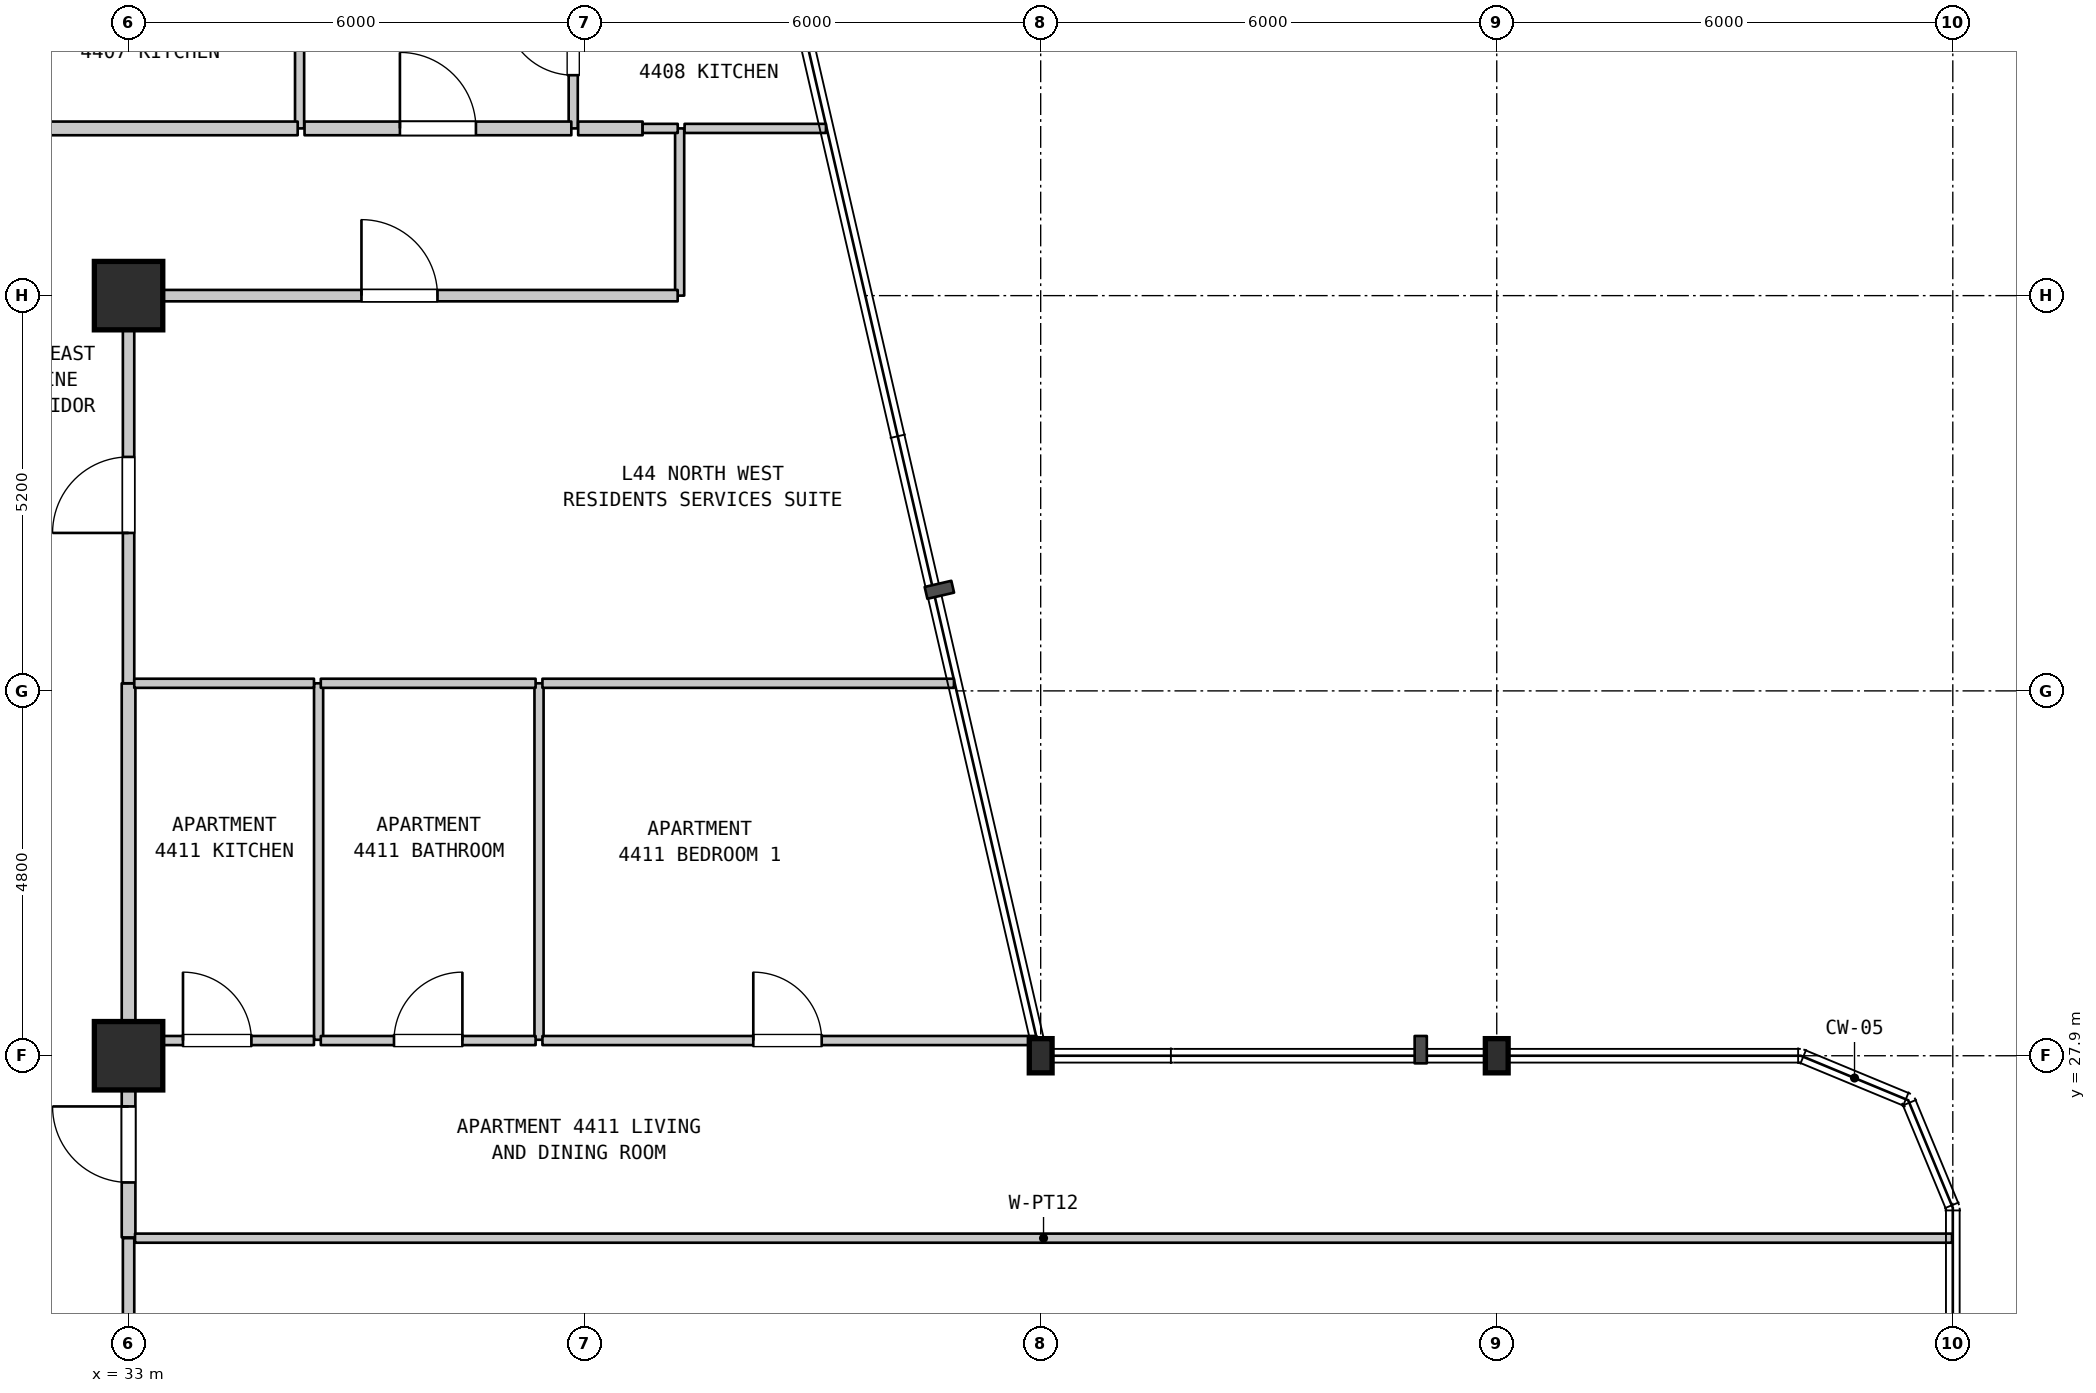
"""IFC4 building model, lengths in metres.
Left out: names, types, materials, properties, quantities, classifications, styles, units other than length and angle.
Written with IfcOpenShell. Run it as: python <this file> out.ifc"""

import sys

from ifc_helpers import new_model, si_unit, direction, frame, frame_2d, origin, origin_2d, place, context, subcontext, project, spatial, rectangle, i_section, extrude, element, fill, save


model = new_model("IFC4")
c1 = context("Model", 3, precision=1e-05, world=origin(), true_north=direction((0.0, 1.0)))
c2 = subcontext(c1, "Body", "Model", "MODEL_VIEW")
j1 = project(units=[si_unit("LENGTHUNIT", "METRE"), si_unit("PLANEANGLEUNIT", "RADIAN")], contexts=[c1])
p1 = place(None, origin())
s1 = spatial("IfcSite", under=j1, at=p1, CompositionType="ELEMENT")
p2 = place(p1, origin())
s2 = spatial("IfcBuilding", under=s1, at=p2, CompositionType="ELEMENT")
p3 = place(p2, frame((0.0, 0.0, 180.2)))
s3 = spatial("IfcBuildingStorey", under=s2, at=p3, CompositionType="ELEMENT", Elevation=180.2)
for number, where, z_axis, x_axis in (
    (1, (33.0, 27.9, 0.0), (0.0, 0.0, 1.0), (1.0, 0.0, 0.0)),
    (2, (33.0, 37.9, 0.0), (0.0, 0.0, 1.0), (1.0, 0.0, 0.0)),
):
    element("IfcColumn", number, at=place(p3, frame(where, z_axis=z_axis, x_axis=x_axis)), inside=s3, PredefinedType="COLUMN", context=c2, shape_type="SweptSolid", body=[
        extrude(rectangle(XDim=0.9, YDim=0.9, at=origin_2d()), origin(), (0.0, 0.0, 1.0), 3.7),
    ])
for number, where, z_axis, x_axis in (
    (3, (45.0, 27.9, 0.0), (0.0, 0.0, 1.0), (1.0, 0.0, 0.0)),
    (4, (51.0, 27.9, 0.0), (0.0, 0.0, 1.0), (1.0, 0.0, 0.0)),
):
    element("IfcColumn", number, at=place(p3, frame(where, z_axis=z_axis, x_axis=x_axis)), inside=s3, PredefinedType="COLUMN", context=c2, shape_type="SweptSolid", body=[
        extrude(i_section(OverallWidth=0.3, OverallDepth=0.45, WebThickness=0.014, FlangeThickness=0.026, FilletRadius=0.027, at=origin_2d()), origin(), (0.0, 0.0, 1.0), 3.7),
    ])
p4 = place(p3, frame((33.0, 19.51, 0.0), z_axis=(0.0, 0.0, 1.0), x_axis=(0.0, 1.0, 0.0)))
e5 = element("IfcWall", 5, at=p4, inside=s3, PredefinedType="STANDARD", context=c2, shape_type="SweptSolid", body=[
    extrude(rectangle(XDim=5.99, YDim=0.15, at=frame_2d((2.995, 0.0))), origin(), (0.0, 0.0, 1.0), 2.98),
])
p5 = place(p4, frame((1.513, 0.0, 0.0)))
e6 = element("IfcOpeningElement", 6, at=p5, cuts=e5, PredefinedType="OPENING", context=c2, shape_type="SweptSolid", body=[
    extrude(rectangle(XDim=1.0, YDim=2.15, at=frame_2d((0.5, 1.075))), frame((0.0, 0.085, 0.0), z_axis=(0.0, -1.0, 0.0), x_axis=(1.0, 0.0, 0.0)), (0.0, 0.0, 1.0), 0.17),
])
p6 = place(p3, frame((33.0, 25.51, 0.0), z_axis=(0.0, 0.0, 1.0), x_axis=(0.0, 1.0, 0.0)))
e7 = element("IfcWall", 7, at=p6, inside=s3, PredefinedType="STANDARD", context=c2, shape_type="SweptSolid", body=[
    extrude(rectangle(XDim=2.6, YDim=0.18, at=frame_2d((1.3, 0.0))), origin(), (0.0, 0.0, 1.0), 2.98),
])
p7 = place(p6, frame((0.723, 0.0, 0.0)))
e8 = element("IfcOpeningElement", 8, at=p7, cuts=e7, PredefinedType="OPENING", context=c2, shape_type="SweptSolid", body=[
    extrude(rectangle(XDim=1.0, YDim=2.15, at=frame_2d((0.5, 1.075))), frame((0.0, 0.1, 0.0), z_axis=(0.0, -1.0, 0.0), x_axis=(1.0, 0.0, 0.0)), (0.0, 0.0, 1.0), 0.2),
])
p8 = place(p3, frame((33.0, 28.11, 0.0), z_axis=(0.0, 0.0, 1.0), x_axis=(0.0, 1.0, 0.0)))
e9 = element("IfcWall", 9, at=p8, inside=s3, PredefinedType="STANDARD", context=c2, shape_type="SweptSolid", body=[
    extrude(rectangle(XDim=4.69, YDim=0.18, at=frame_2d((2.345, 0.0))), origin(), (0.0, 0.0, 1.0), 2.88),
])
p9 = place(p3, frame((33.0, 32.8, 0.0), z_axis=(0.0, 0.0, 1.0), x_axis=(0.0, 1.0, 0.0)))
e10 = element("IfcWall", 10, at=p9, inside=s3, PredefinedType="STANDARD", context=c2, shape_type="SweptSolid", body=[
    extrude(rectangle(XDim=5.1, YDim=0.15, at=frame_2d((2.55, 0.0))), origin(), (0.0, 0.0, 1.0), 2.88),
])
p10 = place(p9, frame((1.978, 0.0, 0.0)))
e11 = element("IfcOpeningElement", 11, at=p10, cuts=e10, PredefinedType="OPENING", context=c2, shape_type="SweptSolid", body=[
    extrude(rectangle(XDim=1.0, YDim=2.15, at=frame_2d((0.5, 1.075))), frame((0.0, 0.085, 0.0), z_axis=(0.0, -1.0, 0.0), x_axis=(1.0, 0.0, 0.0)), (0.0, 0.0, 1.0), 0.17),
])
p11 = place(p3, frame((35.25, 40.1, 0.0), z_axis=(0.0, 0.0, 1.0), x_axis=(0.0, 1.0, 0.0)))
e12 = element("IfcWall", 12, at=p11, inside=s3, PredefinedType="PARTITIONING", context=c2, shape_type="SweptSolid", body=[
    extrude(rectangle(XDim=2.3, YDim=0.12, at=frame_2d((1.15, 0.0))), origin(), (0.0, 0.0, 1.0), 3.38),
])
for number, where, z_axis, x_axis in (
    (13, (35.5, 28.11, 0.0), (0.0, 0.0, 1.0), (0.0, 1.0, 0.0)),
    (14, (38.4, 28.11, 0.0), (0.0, 0.0, 1.0), (0.0, 1.0, 0.0)),
):
    element("IfcWall", number, at=place(p3, frame(where, z_axis=z_axis, x_axis=x_axis)), inside=s3, PredefinedType="PARTITIONING", context=c2, shape_type="SweptSolid", body=[
        extrude(rectangle(XDim=4.69, YDim=0.12, at=frame_2d((2.345, 0.0))), origin(), (0.0, 0.0, 1.0), 3.38),
    ])
p12 = place(p3, frame((38.85, 40.1, 0.0), z_axis=(0.0, 0.0, 1.0), x_axis=(0.0, 1.0, 0.0)))
e15 = element("IfcWall", 15, at=p12, inside=s3, PredefinedType="PARTITIONING", context=c2, shape_type="SweptSolid", body=[
    extrude(rectangle(XDim=2.3, YDim=0.12, at=frame_2d((1.15, 0.0))), origin(), (0.0, 0.0, 1.0), 3.38),
])
p13 = place(p12, frame((0.7, 0.0, 0.0)))
e16 = element("IfcOpeningElement", 16, at=p13, cuts=e15, PredefinedType="OPENING", context=c2, shape_type="SweptSolid", body=[
    extrude(rectangle(XDim=0.9, YDim=2.15, at=frame_2d((0.45, 1.075))), frame((0.0, 0.07, 0.0), z_axis=(0.0, -1.0, 0.0), x_axis=(1.0, 0.0, 0.0)), (0.0, 0.0, 1.0), 0.14),
])
p14 = place(p3, frame((40.25, 37.9, 0.0), z_axis=(0.0, 0.0, 1.0), x_axis=(0.0, 1.0, 0.0)))
e17 = element("IfcWall", 17, at=p14, inside=s3, PredefinedType="PARTITIONING", context=c2, shape_type="SweptSolid", body=[
    extrude(rectangle(XDim=2.2, YDim=0.12, at=frame_2d((1.1, 0.0))), origin(), (0.0, 0.0, 1.0), 3.38),
])
p15 = place(p3, frame((33.085, 25.5, 0.0), z_axis=(0.0, 0.0, 1.0), x_axis=(1.0, 0.0, 0.0)))
e18 = element("IfcWall", 18, at=p15, inside=s3, PredefinedType="PARTITIONING", context=c2, shape_type="SweptSolid", body=[
    extrude(rectangle(XDim=23.905, YDim=0.12, at=frame_2d((11.953, 0.0))), origin(), (0.0, 0.0, 1.0), 3.38),
])
p16 = place(p3, frame((33.075, 28.1, 0.0), z_axis=(0.0, 0.0, 1.0), x_axis=(1.0, 0.0, 0.0)))
e19 = element("IfcWall", 19, at=p16, inside=s3, PredefinedType="PARTITIONING", context=c2, shape_type="SweptSolid", body=[
    extrude(rectangle(XDim=2.364, YDim=0.12, at=frame_2d((1.182, 0.0))), origin(), (0.0, 0.0, 1.0), 3.38),
])
p17 = place(p16, frame((0.641, 0.0, 0.0)))
e20 = element("IfcOpeningElement", 20, at=p17, cuts=e19, PredefinedType="OPENING", context=c2, shape_type="SweptSolid", body=[
    extrude(rectangle(XDim=0.9, YDim=2.15, at=frame_2d((0.45, 1.075))), frame((0.0, 0.07, 0.0), z_axis=(0.0, -1.0, 0.0), x_axis=(1.0, 0.0, 0.0)), (0.0, 0.0, 1.0), 0.14),
])
p18 = place(p3, frame((35.529, 28.1, 0.0), z_axis=(0.0, 0.0, 1.0), x_axis=(1.0, 0.0, 0.0)))
e21 = element("IfcWall", 21, at=p18, inside=s3, PredefinedType="PARTITIONING", context=c2, shape_type="SweptSolid", body=[
    extrude(rectangle(XDim=2.826, YDim=0.12, at=frame_2d((1.413, 0.0))), origin(), (0.0, 0.0, 1.0), 3.38),
])
p19 = place(p18, frame((0.963, 0.0, 0.0)))
e22 = element("IfcOpeningElement", 22, at=p19, cuts=e21, PredefinedType="OPENING", context=c2, shape_type="SweptSolid", body=[
    extrude(rectangle(XDim=0.9, YDim=2.1, at=frame_2d((0.45, 1.05))), frame((0.0, 0.07, 0.0), z_axis=(0.0, -1.0, 0.0), x_axis=(1.0, 0.0, 0.0)), (0.0, 0.0, 1.0), 0.14),
])
p20 = place(p3, frame((38.445, 28.1, 0.0), z_axis=(0.0, 0.0, 1.0), x_axis=(1.0, 0.0, 0.0)))
e23 = element("IfcWall", 23, at=p20, inside=s3, PredefinedType="PARTITIONING", context=c2, shape_type="SweptSolid", body=[
    extrude(rectangle(XDim=6.499, YDim=0.12, at=frame_2d((3.25, 0.0))), origin(), (0.0, 0.0, 1.0), 3.38),
])
p21 = place(p20, frame((2.774, 0.0, 0.0)))
e24 = element("IfcOpeningElement", 24, at=p21, cuts=e23, PredefinedType="OPENING", context=c2, shape_type="SweptSolid", body=[
    extrude(rectangle(XDim=0.9, YDim=2.15, at=frame_2d((0.45, 1.075))), frame((0.0, 0.07, 0.0), z_axis=(0.0, -1.0, 0.0), x_axis=(1.0, 0.0, 0.0)), (0.0, 0.0, 1.0), 0.14),
])
p22 = place(p3, frame((33.075, 32.8, 0.0), z_axis=(0.0, 0.0, 1.0), x_axis=(1.0, 0.0, 0.0)))
e25 = element("IfcWall", 25, at=p22, inside=s3, PredefinedType="PARTITIONING", context=c2, shape_type="SweptSolid", body=[
    extrude(rectangle(XDim=2.364, YDim=0.12, at=frame_2d((1.182, 0.0))), origin(), (0.0, 0.0, 1.0), 3.38),
])
p23 = place(p3, frame((35.529, 32.8, 0.0), z_axis=(0.0, 0.0, 1.0), x_axis=(1.0, 0.0, 0.0)))
e26 = element("IfcWall", 26, at=p23, inside=s3, PredefinedType="PARTITIONING", context=c2, shape_type="SweptSolid", body=[
    extrude(rectangle(XDim=2.826, YDim=0.12, at=frame_2d((1.413, 0.0))), origin(), (0.0, 0.0, 1.0), 3.38),
])
p24 = place(p3, frame((38.445, 32.8, 0.0), z_axis=(0.0, 0.0, 1.0), x_axis=(1.0, 0.0, 0.0)))
e27 = element("IfcWall", 27, at=p24, inside=s3, PredefinedType="PARTITIONING", context=c2, shape_type="SweptSolid", body=[
    extrude(rectangle(XDim=5.414, YDim=0.12, at=frame_2d((2.707, 0.0))), origin(), (0.0, 0.0, 1.0), 3.38),
])
p25 = place(p3, frame((33.06, 37.9, 0.0), z_axis=(0.0, 0.0, 1.0), x_axis=(1.0, 0.0, 0.0)))
e28 = element("IfcWall", 28, at=p25, inside=s3, PredefinedType="STANDARD", context=c2, shape_type="SweptSolid", body=[
    extrude(rectangle(XDim=7.164, YDim=0.15, at=frame_2d((3.582, 0.0))), origin(), (0.0, 0.0, 1.0), 3.38),
])
p26 = place(p25, frame((3.004, 0.0, 0.0)))
e29 = element("IfcOpeningElement", 29, at=p26, cuts=e28, PredefinedType="OPENING", context=c2, shape_type="SweptSolid", body=[
    extrude(rectangle(XDim=1.0, YDim=2.15, at=frame_2d((0.5, 1.075))), frame((0.0, 0.085, 0.0), z_axis=(0.0, -1.0, 0.0), x_axis=(1.0, 0.0, 0.0)), (0.0, 0.0, 1.0), 0.17),
])
p27 = place(p3, frame((30.875, 40.1, 0.0), z_axis=(0.0, 0.0, 1.0), x_axis=(1.0, 0.0, 0.0)))
e30 = element("IfcWall", 30, at=p27, inside=s3, PredefinedType="STANDARD", context=c2, shape_type="SweptSolid", body=[
    extrude(rectangle(XDim=4.35, YDim=0.18, at=frame_2d((2.175, 0.0))), origin(), (0.0, 0.0, 1.0), 3.38),
])
p28 = place(p3, frame((35.315, 40.1, 0.0), z_axis=(0.0, 0.0, 1.0), x_axis=(1.0, 0.0, 0.0)))
e31 = element("IfcWall", 31, at=p28, inside=s3, PredefinedType="STANDARD", context=c2, shape_type="SweptSolid", body=[
    extrude(rectangle(XDim=3.51, YDim=0.18, at=frame_2d((1.755, 0.0))), origin(), (0.0, 0.0, 1.0), 3.38),
])
p29 = place(p28, frame((1.255, 0.0, 0.0)))
e32 = element("IfcOpeningElement", 32, at=p29, cuts=e31, PredefinedType="OPENING", context=c2, shape_type="SweptSolid", body=[
    extrude(rectangle(XDim=1.0, YDim=2.15, at=frame_2d((0.5, 1.075))), frame((0.0, 0.1, 0.0), z_axis=(0.0, -1.0, 0.0), x_axis=(1.0, 0.0, 0.0)), (0.0, 0.0, 1.0), 0.2),
])
p30 = place(p3, frame((38.915, 40.1, 0.0), z_axis=(0.0, 0.0, 1.0), x_axis=(1.0, 0.0, 0.0)))
e33 = element("IfcWall", 33, at=p30, inside=s3, PredefinedType="STANDARD", context=c2, shape_type="SweptSolid", body=[
    extrude(rectangle(XDim=0.848, YDim=0.18, at=frame_2d((0.424, 0.0))), origin(), (0.0, 0.0, 1.0), 3.38),
])
p31 = place(p3, frame((39.763, 40.1, 0.0), z_axis=(0.0, 0.0, 1.0), x_axis=(1.0, 0.0, 0.0)))
e34 = element("IfcWall", 34, at=p31, inside=s3, PredefinedType="PARTITIONING", context=c2, shape_type="SweptSolid", body=[
    extrude(rectangle(XDim=0.462, YDim=0.12, at=frame_2d((0.231, 0.0))), origin(), (0.0, 0.0, 1.0), 3.38),
])
p32 = place(p3, frame((40.315, 40.1, 0.0), z_axis=(0.0, 0.0, 1.0), x_axis=(1.0, 0.0, 0.0)))
e35 = element("IfcWall", 35, at=p32, inside=s3, PredefinedType="PARTITIONING", context=c2, shape_type="SweptSolid", body=[
    extrude(rectangle(XDim=1.86, YDim=0.12, at=frame_2d((0.93, 0.0))), origin(), (0.0, 0.0, 1.0), 3.38),
])
p33 = place(p7, origin())
e36 = element("IfcDoor", 36, at=p33, inside=s3, OperationType="SINGLE_SWING_RIGHT", PredefinedType="DOOR", context=c2, shape_type="SweptSolid", body=[
    extrude(rectangle(XDim=1.0, YDim=2.15, at=frame_2d((0.5, 1.075))), frame((0.0, 0.025, 0.0), z_axis=(0.0, -1.0, 0.0), x_axis=(1.0, 0.0, 0.0)), (0.0, 0.0, 1.0), 0.05),
])
fill(e8, e36)
p34 = place(p10, origin())
e37 = element("IfcDoor", 37, at=p34, inside=s3, OperationType="SINGLE_SWING_LEFT", PredefinedType="DOOR", context=c2, shape_type="SweptSolid", body=[
    extrude(rectangle(XDim=1.0, YDim=2.15, at=frame_2d((0.5, 1.075))), frame((0.0, 0.025, 0.0), z_axis=(0.0, -1.0, 0.0), x_axis=(1.0, 0.0, 0.0)), (0.0, 0.0, 1.0), 0.05),
])
fill(e11, e37)
p35 = place(p13, origin())
e38 = element("IfcDoor", 38, at=p35, inside=s3, OperationType="SINGLE_SWING_RIGHT", PredefinedType="DOOR", context=c2, shape_type="SweptSolid", body=[
    extrude(rectangle(XDim=0.9, YDim=2.15, at=frame_2d((0.45, 1.075))), frame((0.0, 0.025, 0.0), z_axis=(0.0, -1.0, 0.0), x_axis=(1.0, 0.0, 0.0)), (0.0, 0.0, 1.0), 0.05),
])
fill(e16, e38)
p36 = place(p17, origin())
e39 = element("IfcDoor", 39, at=p36, inside=s3, OperationType="SINGLE_SWING_LEFT", PredefinedType="DOOR", context=c2, shape_type="SweptSolid", body=[
    extrude(rectangle(XDim=0.9, YDim=2.15, at=frame_2d((0.45, 1.075))), frame((0.0, 0.025, 0.0), z_axis=(0.0, -1.0, 0.0), x_axis=(1.0, 0.0, 0.0)), (0.0, 0.0, 1.0), 0.05),
])
fill(e20, e39)
p37 = place(p19, origin())
e40 = element("IfcDoor", 40, at=p37, inside=s3, OperationType="SINGLE_SWING_RIGHT", PredefinedType="DOOR", context=c2, shape_type="SweptSolid", body=[
    extrude(rectangle(XDim=0.9, YDim=2.1, at=frame_2d((0.45, 1.05))), frame((0.0, 0.025, 0.0), z_axis=(0.0, -1.0, 0.0), x_axis=(1.0, 0.0, 0.0)), (0.0, 0.0, 1.0), 0.05),
])
fill(e22, e40)
p38 = place(p21, origin())
e41 = element("IfcDoor", 41, at=p38, inside=s3, OperationType="SINGLE_SWING_LEFT", PredefinedType="DOOR", context=c2, shape_type="SweptSolid", body=[
    extrude(rectangle(XDim=0.9, YDim=2.15, at=frame_2d((0.45, 1.075))), frame((0.0, 0.025, 0.0), z_axis=(0.0, -1.0, 0.0), x_axis=(1.0, 0.0, 0.0)), (0.0, 0.0, 1.0), 0.05),
])
fill(e24, e41)
p39 = place(p26, origin())
e42 = element("IfcDoor", 42, at=p39, inside=s3, OperationType="SINGLE_SWING_LEFT", PredefinedType="DOOR", context=c2, shape_type="SweptSolid", body=[
    extrude(rectangle(XDim=1.0, YDim=2.15, at=frame_2d((0.5, 1.075))), frame((0.0, 0.025, 0.0), z_axis=(0.0, -1.0, 0.0), x_axis=(1.0, 0.0, 0.0)), (0.0, 0.0, 1.0), 0.05),
])
fill(e29, e42)
p40 = place(p29, origin())
e43 = element("IfcDoor", 43, at=p40, inside=s3, OperationType="SINGLE_SWING_LEFT", PredefinedType="DOOR", context=c2, shape_type="SweptSolid", body=[
    extrude(rectangle(XDim=1.0, YDim=2.15, at=frame_2d((0.5, 1.075))), frame((0.0, 0.025, 0.0), z_axis=(0.0, -1.0, 0.0), x_axis=(1.0, 0.0, 0.0)), (0.0, 0.0, 1.0), 0.05),
])
fill(e32, e43)
save(model, sys.argv[1])
